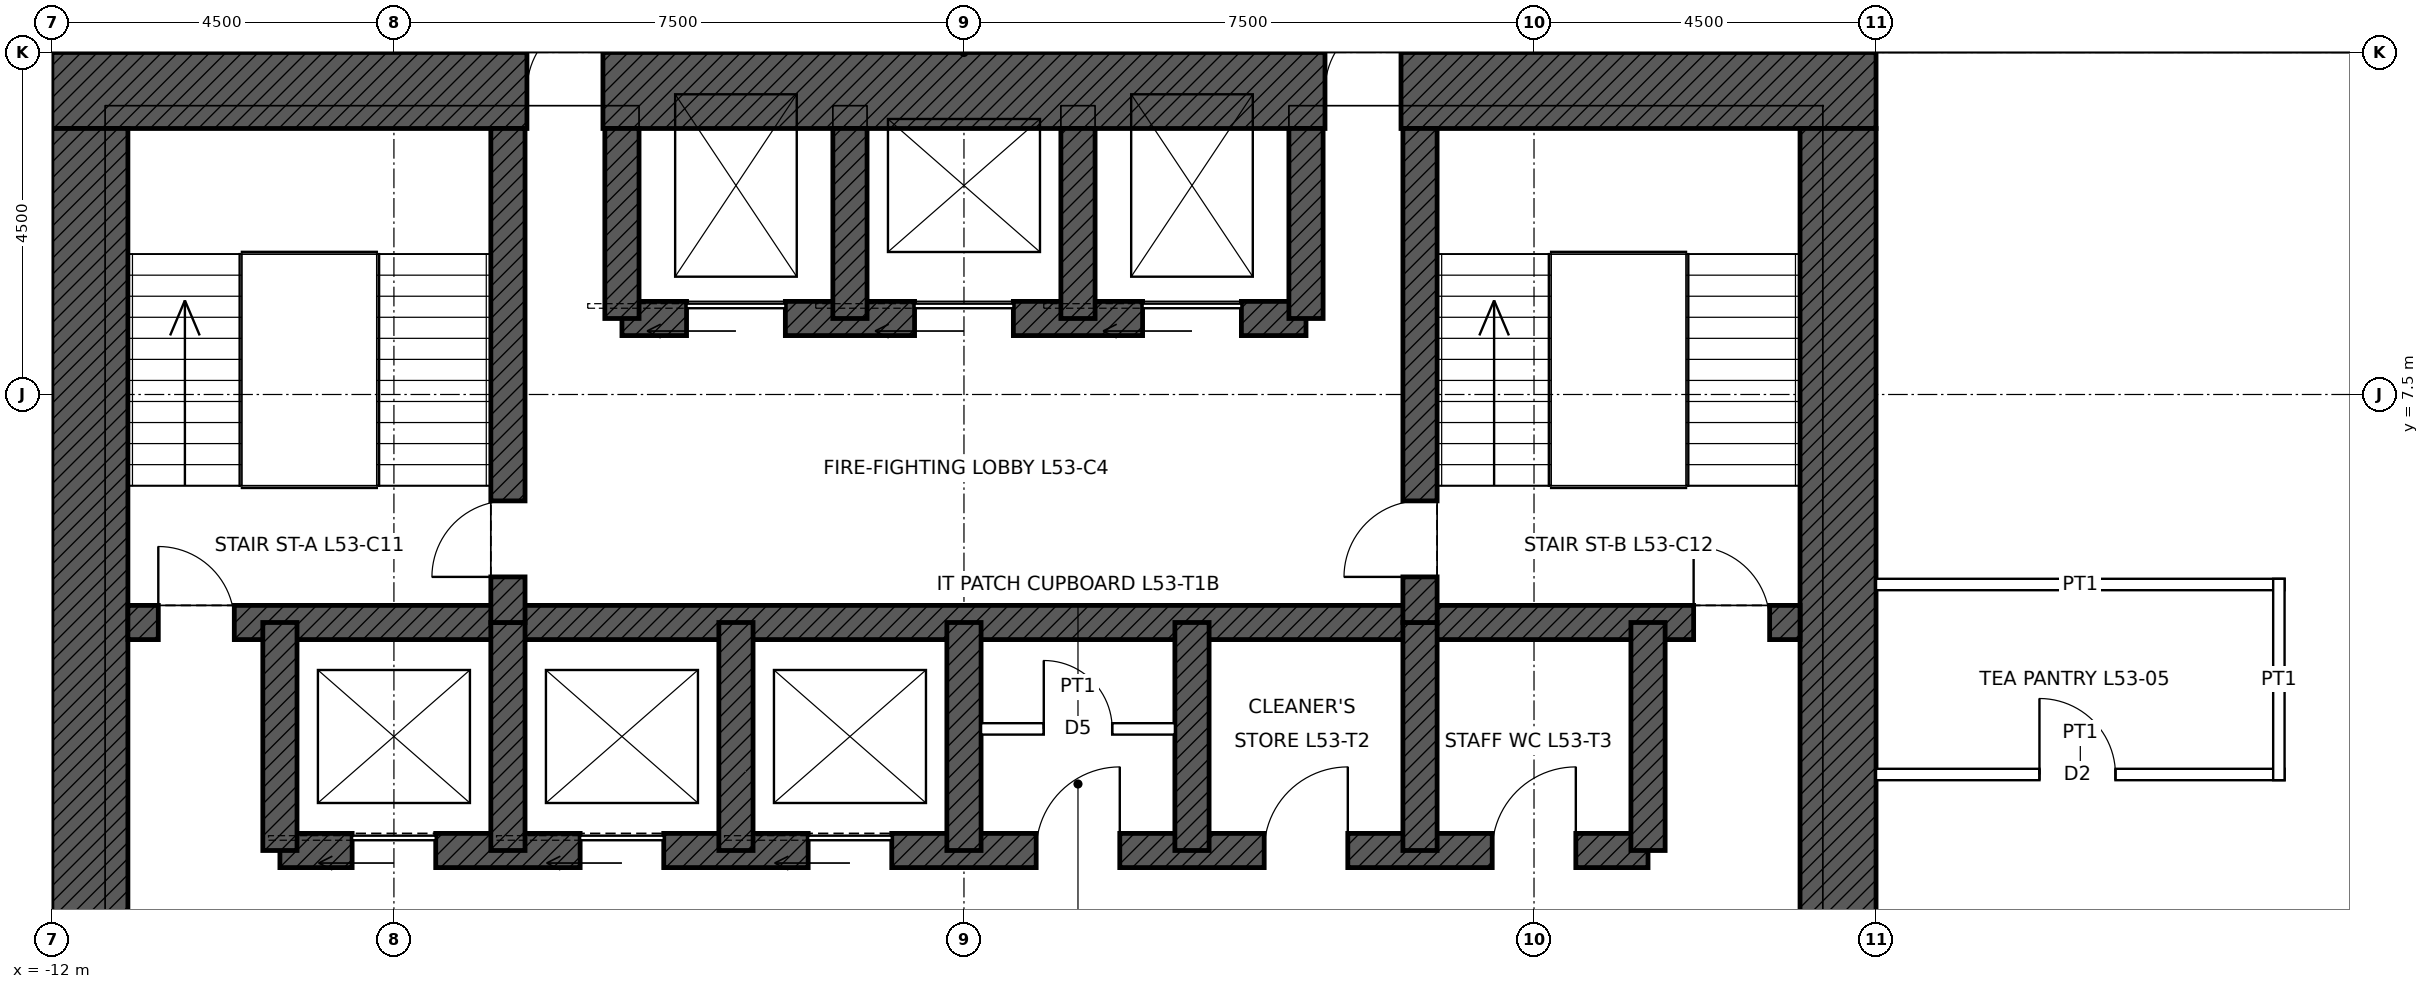
"""IFC4 building model, lengths in metres.
Left out: names, types, materials, properties, quantities, classifications, styles, units other than length and angle.
Written with IfcOpenShell. Run it as: python <this file> out.ifc"""

import sys

from ifc_helpers import new_model, si_unit, direction, frame, frame_2d, origin, place, context, subcontext, project, spatial, rectangle, extrude, element, fill, save


model = new_model("IFC4")
c1 = context("Model", 3, precision=1e-05, world=origin(), true_north=direction((0.0, 1.0)))
c2 = subcontext(c1, "Body", "Model", "MODEL_VIEW")
j1 = project(units=[si_unit("LENGTHUNIT", "METRE"), si_unit("PLANEANGLEUNIT", "RADIAN")], contexts=[c1])
p1 = place(None, origin())
s1 = spatial("IfcSite", under=j1, at=p1, CompositionType="ELEMENT")
p2 = place(p1, origin())
s2 = spatial("IfcBuilding", under=s1, at=p2, CompositionType="ELEMENT")
p3 = place(p2, frame((0.0, 0.0, 245.9)))
s3 = spatial("IfcBuildingStorey", under=s2, at=p3, CompositionType="ELEMENT", Elevation=245.9)
p4 = place(p3, frame((-12.0, 11.5, 0.0), z_axis=(0.0, 0.0, 1.0), x_axis=(1.0, 0.0, 0.0)))
e1 = element("IfcWall", 1, at=p4, inside=s3, PredefinedType="SHEAR", context=c2, shape_type="SweptSolid", body=[
    extrude(rectangle(XDim=24.0, YDim=1.0, at=frame_2d((12.0, 0.0))), origin(), (0.0, 0.0, 1.0), 4.0),
])
p5 = place(p4, frame((6.25, 0.0, 0.0)))
e2 = element("IfcOpeningElement", 2, at=p5, cuts=e1, PredefinedType="OPENING", context=c2, shape_type="SweptSolid", body=[
    extrude(rectangle(XDim=1.0, YDim=2.4, at=frame_2d((0.5, 1.2))), frame((0.0, 0.51, 0.0), z_axis=(0.0, -1.0, 0.0), x_axis=(1.0, 0.0, 0.0)), (0.0, 0.0, 1.0), 1.02),
])
p6 = place(p4, frame((16.75, 0.0, 0.0)))
e3 = element("IfcOpeningElement", 3, at=p6, cuts=e1, PredefinedType="OPENING", context=c2, shape_type="SweptSolid", body=[
    extrude(rectangle(XDim=1.0, YDim=2.4, at=frame_2d((0.5, 1.2))), frame((0.0, 0.51, 0.0), z_axis=(0.0, -1.0, 0.0), x_axis=(1.0, 0.0, 0.0)), (0.0, 0.0, 1.0), 1.02),
])
p7 = place(p3, frame((11.5, 11.0, 0.0), z_axis=(0.0, 0.0, 1.0), x_axis=(0.0, -1.0, 0.0)))
e4 = element("IfcWall", 4, at=p7, inside=s3, PredefinedType="SHEAR", context=c2, shape_type="SweptSolid", body=[
    extrude(rectangle(XDim=22.0, YDim=1.0, at=frame_2d((11.0, 0.0))), origin(), (0.0, 0.0, 1.0), 4.0),
])
p8 = place(p7, frame((10.5, 0.0, 0.0)))
e5 = element("IfcOpeningElement", 5, at=p8, cuts=e4, PredefinedType="OPENING", context=c2, shape_type="SweptSolid", body=[
    extrude(rectangle(XDim=1.0, YDim=2.4, at=frame_2d((0.5, 1.2))), frame((0.0, 0.51, 0.0), z_axis=(0.0, -1.0, 0.0), x_axis=(1.0, 0.0, 0.0)), (0.0, 0.0, 1.0), 1.02),
])
p9 = place(p3, frame((-11.5, -11.0, 0.0), z_axis=(0.0, 0.0, 1.0), x_axis=(0.0, 1.0, 0.0)))
e6 = element("IfcWall", 6, at=p9, inside=s3, PredefinedType="SHEAR", context=c2, shape_type="SweptSolid", body=[
    extrude(rectangle(XDim=22.0, YDim=1.0, at=frame_2d((11.0, 0.0))), origin(), (0.0, 0.0, 1.0), 4.0),
])
p10 = place(p9, frame((10.5, 0.0, 0.0)))
e7 = element("IfcOpeningElement", 7, at=p10, cuts=e6, PredefinedType="OPENING", context=c2, shape_type="SweptSolid", body=[
    extrude(rectangle(XDim=1.0, YDim=2.4, at=frame_2d((0.5, 1.2))), frame((0.0, 0.51, 0.0), z_axis=(0.0, -1.0, 0.0), x_axis=(1.0, 0.0, 0.0)), (0.0, 0.0, 1.0), 1.02),
])
p11 = place(p3, frame((-11.0, 4.5, 0.0), z_axis=(0.0, 0.0, 1.0), x_axis=(1.0, 0.0, 0.0)))
e8 = element("IfcWall", 8, at=p11, inside=s3, PredefinedType="SHEAR", context=c2, shape_type="SweptSolid", body=[
    extrude(rectangle(XDim=22.0, YDim=0.45, at=frame_2d((11.0, 0.0))), origin(), (0.0, 0.0, 1.0), 4.0),
])
p12 = place(p11, frame((0.4, 0.0, 0.0)))
e9 = element("IfcOpeningElement", 9, at=p12, cuts=e8, PredefinedType="OPENING", context=c2, shape_type="SweptSolid", body=[
    extrude(rectangle(XDim=1.0, YDim=2.1, at=frame_2d((0.5, 1.05))), frame((0.0, 0.235, 0.0), z_axis=(0.0, -1.0, 0.0), x_axis=(1.0, 0.0, 0.0)), (0.0, 0.0, 1.0), 0.47),
])
p13 = place(p11, frame((20.6, 0.0, 0.0)))
e10 = element("IfcOpeningElement", 10, at=p13, cuts=e8, PredefinedType="OPENING", context=c2, shape_type="SweptSolid", body=[
    extrude(rectangle(XDim=1.0, YDim=2.1, at=frame_2d((0.5, 1.05))), frame((0.0, 0.235, 0.0), z_axis=(0.0, -1.0, 0.0), x_axis=(1.0, 0.0, 0.0)), (0.0, 0.0, 1.0), 0.47),
])
p14 = place(p3, frame((-9.0, 1.5, 0.0), z_axis=(0.0, 0.0, 1.0), x_axis=(1.0, 0.0, 0.0)))
e11 = element("IfcWall", 11, at=p14, inside=s3, PredefinedType="SHEAR", context=c2, shape_type="SweptSolid", body=[
    extrude(rectangle(XDim=18.0, YDim=0.45, at=frame_2d((9.0, 0.0))), origin(), (0.0, 0.0, 1.0), 4.0),
])
p15 = place(p14, frame((0.95, 0.0, 0.0)))
e12 = element("IfcOpeningElement", 12, at=p15, cuts=e11, PredefinedType="OPENING", context=c2, shape_type="SweptSolid", body=[
    extrude(rectangle(XDim=1.1, YDim=2.1, at=frame_2d((0.55, 1.05))), frame((0.0, 0.235, 0.0), z_axis=(0.0, -1.0, 0.0), x_axis=(1.0, 0.0, 0.0)), (0.0, 0.0, 1.0), 0.47),
])
p16 = place(p14, frame((3.95, 0.0, 0.0)))
e13 = element("IfcOpeningElement", 13, at=p16, cuts=e11, PredefinedType="OPENING", context=c2, shape_type="SweptSolid", body=[
    extrude(rectangle(XDim=1.1, YDim=2.1, at=frame_2d((0.55, 1.05))), frame((0.0, 0.235, 0.0), z_axis=(0.0, -1.0, 0.0), x_axis=(1.0, 0.0, 0.0)), (0.0, 0.0, 1.0), 0.47),
])
p17 = place(p14, frame((6.95, 0.0, 0.0)))
e14 = element("IfcOpeningElement", 14, at=p17, cuts=e11, PredefinedType="OPENING", context=c2, shape_type="SweptSolid", body=[
    extrude(rectangle(XDim=1.1, YDim=2.1, at=frame_2d((0.55, 1.05))), frame((0.0, 0.235, 0.0), z_axis=(0.0, -1.0, 0.0), x_axis=(1.0, 0.0, 0.0)), (0.0, 0.0, 1.0), 0.47),
])
p18 = place(p14, frame((9.95, 0.0, 0.0)))
e15 = element("IfcOpeningElement", 15, at=p18, cuts=e11, PredefinedType="OPENING", context=c2, shape_type="SweptSolid", body=[
    extrude(rectangle(XDim=1.1, YDim=2.1, at=frame_2d((0.55, 1.05))), frame((0.0, 0.235, 0.0), z_axis=(0.0, -1.0, 0.0), x_axis=(1.0, 0.0, 0.0)), (0.0, 0.0, 1.0), 0.47),
])
p19 = place(p14, frame((12.95, 0.0, 0.0)))
e16 = element("IfcOpeningElement", 16, at=p19, cuts=e11, PredefinedType="OPENING", context=c2, shape_type="SweptSolid", body=[
    extrude(rectangle(XDim=1.1, YDim=2.1, at=frame_2d((0.55, 1.05))), frame((0.0, 0.235, 0.0), z_axis=(0.0, -1.0, 0.0), x_axis=(1.0, 0.0, 0.0)), (0.0, 0.0, 1.0), 0.47),
])
p20 = place(p14, frame((15.95, 0.0, 0.0)))
e17 = element("IfcOpeningElement", 17, at=p20, cuts=e11, PredefinedType="OPENING", context=c2, shape_type="SweptSolid", body=[
    extrude(rectangle(XDim=1.1, YDim=2.1, at=frame_2d((0.55, 1.05))), frame((0.0, 0.235, 0.0), z_axis=(0.0, -1.0, 0.0), x_axis=(1.0, 0.0, 0.0)), (0.0, 0.0, 1.0), 0.47),
])
p21 = place(p3, frame((-4.5, 8.5, 0.0), z_axis=(0.0, 0.0, 1.0), x_axis=(1.0, 0.0, 0.0)))
e18 = element("IfcWall", 18, at=p21, inside=s3, PredefinedType="SHEAR", context=c2, shape_type="SweptSolid", body=[
    extrude(rectangle(XDim=9.0, YDim=0.45, at=frame_2d((4.5, 0.0))), origin(), (0.0, 0.0, 1.0), 4.0),
])
p22 = place(p21, frame((0.85, 0.0, 0.0)))
e19 = element("IfcOpeningElement", 19, at=p22, cuts=e18, PredefinedType="OPENING", context=c2, shape_type="SweptSolid", body=[
    extrude(rectangle(XDim=1.3, YDim=2.4, at=frame_2d((0.65, 1.2))), frame((0.0, 0.235, 0.0), z_axis=(0.0, -1.0, 0.0), x_axis=(1.0, 0.0, 0.0)), (0.0, 0.0, 1.0), 0.47),
])
p23 = place(p21, frame((6.85, 0.0, 0.0)))
e20 = element("IfcOpeningElement", 20, at=p23, cuts=e18, PredefinedType="OPENING", context=c2, shape_type="SweptSolid", body=[
    extrude(rectangle(XDim=1.3, YDim=2.4, at=frame_2d((0.65, 1.2))), frame((0.0, 0.235, 0.0), z_axis=(0.0, -1.0, 0.0), x_axis=(1.0, 0.0, 0.0)), (0.0, 0.0, 1.0), 0.47),
])
p24 = place(p21, frame((3.85, 0.0, 0.0)))
e21 = element("IfcOpeningElement", 21, at=p24, cuts=e18, PredefinedType="OPENING", context=c2, shape_type="SweptSolid", body=[
    extrude(rectangle(XDim=1.3, YDim=2.4, at=frame_2d((0.65, 1.2))), frame((0.0, 0.235, 0.0), z_axis=(0.0, -1.0, 0.0), x_axis=(1.0, 0.0, 0.0)), (0.0, 0.0, 1.0), 0.47),
])
for number, where, z_axis, x_axis in (
    (22, (-9.0, 1.5, 0.0), (0.0, 0.0, 1.0), (0.0, 1.0, 0.0)),
    (23, (9.0, 1.5, 0.0), (0.0, 0.0, 1.0), (0.0, 1.0, 0.0)),
    (24, (-6.0, 1.5, 0.0), (0.0, 0.0, 1.0), (0.0, 1.0, 0.0)),
    (25, (-3.0, 1.5, 0.0), (0.0, 0.0, 1.0), (0.0, 1.0, 0.0)),
    (26, (0.0, 1.5, 0.0), (0.0, 0.0, 1.0), (0.0, 1.0, 0.0)),
    (27, (3.0, 1.5, 0.0), (0.0, 0.0, 1.0), (0.0, 1.0, 0.0)),
    (28, (6.0, 1.5, 0.0), (0.0, 0.0, 1.0), (0.0, 1.0, 0.0)),
):
    element("IfcWall", number, at=place(p3, frame(where, z_axis=z_axis, x_axis=x_axis)), inside=s3, PredefinedType="SHEAR", context=c2, shape_type="SweptSolid", body=[
        extrude(rectangle(XDim=3.0, YDim=0.45, at=frame_2d((1.5, 0.0))), origin(), (0.0, 0.0, 1.0), 4.0),
    ])
p25 = place(p3, frame((-6.0, 4.5, 0.0), z_axis=(0.0, 0.0, 1.0), x_axis=(0.0, 1.0, 0.0)))
e29 = element("IfcWall", 29, at=p25, inside=s3, PredefinedType="SHEAR", context=c2, shape_type="SweptSolid", body=[
    extrude(rectangle(XDim=6.5, YDim=0.45, at=frame_2d((3.25, 0.0))), origin(), (0.0, 0.0, 1.0), 4.0),
])
p26 = place(p25, frame((0.6, 0.0, 0.0)))
e30 = element("IfcOpeningElement", 30, at=p26, cuts=e29, PredefinedType="OPENING", context=c2, shape_type="SweptSolid", body=[
    extrude(rectangle(XDim=1.0, YDim=2.1, at=frame_2d((0.5, 1.05))), frame((0.0, 0.235, 0.0), z_axis=(0.0, -1.0, 0.0), x_axis=(1.0, 0.0, 0.0)), (0.0, 0.0, 1.0), 0.47),
])
p27 = place(p3, frame((6.0, 4.5, 0.0), z_axis=(0.0, 0.0, 1.0), x_axis=(0.0, 1.0, 0.0)))
e31 = element("IfcWall", 31, at=p27, inside=s3, PredefinedType="SHEAR", context=c2, shape_type="SweptSolid", body=[
    extrude(rectangle(XDim=6.5, YDim=0.45, at=frame_2d((3.25, 0.0))), origin(), (0.0, 0.0, 1.0), 4.0),
])
p28 = place(p27, frame((0.6, 0.0, 0.0)))
e32 = element("IfcOpeningElement", 32, at=p28, cuts=e31, PredefinedType="OPENING", context=c2, shape_type="SweptSolid", body=[
    extrude(rectangle(XDim=1.0, YDim=2.1, at=frame_2d((0.5, 1.05))), frame((0.0, 0.235, 0.0), z_axis=(0.0, -1.0, 0.0), x_axis=(1.0, 0.0, 0.0)), (0.0, 0.0, 1.0), 0.47),
])
for number, where, z_axis, x_axis in (
    (33, (-4.5, 8.5, 0.0), (0.0, 0.0, 1.0), (0.0, 1.0, 0.0)),
    (34, (4.5, 8.5, 0.0), (0.0, 0.0, 1.0), (0.0, 1.0, 0.0)),
    (35, (-1.5, 8.5, 0.0), (0.0, 0.0, 1.0), (0.0, 1.0, 0.0)),
    (36, (1.5, 8.5, 0.0), (0.0, 0.0, 1.0), (0.0, 1.0, 0.0)),
):
    element("IfcWall", number, at=place(p3, frame(where, z_axis=z_axis, x_axis=x_axis)), inside=s3, PredefinedType="SHEAR", context=c2, shape_type="SweptSolid", body=[
        extrude(rectangle(XDim=2.5, YDim=0.45, at=frame_2d((1.25, 0.0))), origin(), (0.0, 0.0, 1.0), 4.0),
    ])
p29 = place(p3, frame((12.0, 2.5, 0.0), z_axis=(0.0, 0.0, 1.0), x_axis=(1.0, 0.0, 0.0)))
e37 = element("IfcWall", 37, at=p29, inside=s3, PredefinedType="PARTITIONING", context=c2, shape_type="SweptSolid", body=[
    extrude(rectangle(XDim=5.375, YDim=0.15, at=frame_2d((2.688, 0.0))), origin(), (0.0, 0.0, 1.0), 3.85),
])
p30 = place(p29, frame((2.15, 0.0, 0.0)))
e38 = element("IfcOpeningElement", 38, at=p30, cuts=e37, PredefinedType="OPENING", context=c2, shape_type="SweptSolid", body=[
    extrude(rectangle(XDim=1.0, YDim=2.1, at=frame_2d((0.5, 1.05))), frame((0.0, 0.085, 0.0), z_axis=(0.0, -1.0, 0.0), x_axis=(1.0, 0.0, 0.0)), (0.0, 0.0, 1.0), 0.17),
])
p31 = place(p3, frame((12.0, 5.0, 0.0), z_axis=(0.0, 0.0, 1.0), x_axis=(1.0, 0.0, 0.0)))
e39 = element("IfcWall", 39, at=p31, inside=s3, PredefinedType="PARTITIONING", context=c2, shape_type="SweptSolid", body=[
    extrude(rectangle(XDim=5.375, YDim=0.15, at=frame_2d((2.688, 0.0))), origin(), (0.0, 0.0, 1.0), 3.85),
])
p32 = place(p3, frame((17.3, 2.425, 0.0), z_axis=(0.0, 0.0, 1.0), x_axis=(0.0, 1.0, 0.0)))
e40 = element("IfcWall", 40, at=p32, inside=s3, PredefinedType="PARTITIONING", context=c2, shape_type="SweptSolid", body=[
    extrude(rectangle(XDim=2.65, YDim=0.15, at=frame_2d((1.325, 0.0))), origin(), (0.0, 0.0, 1.0), 3.85),
])
p33 = place(p3, frame((0.225, 3.1, 0.0), z_axis=(0.0, 0.0, 1.0), x_axis=(1.0, 0.0, 0.0)))
e41 = element("IfcWall", 41, at=p33, inside=s3, PredefinedType="PARTITIONING", context=c2, shape_type="SweptSolid", body=[
    extrude(rectangle(XDim=2.55, YDim=0.15, at=frame_2d((1.275, 0.0))), origin(), (0.0, 0.0, 1.0), 3.75),
])
p34 = place(p33, frame((0.825, 0.0, 0.0)))
e42 = element("IfcOpeningElement", 42, at=p34, cuts=e41, PredefinedType="OPENING", context=c2, shape_type="SweptSolid", body=[
    extrude(rectangle(XDim=0.9, YDim=2.1, at=frame_2d((0.45, 1.05))), frame((0.0, 0.085, 0.0), z_axis=(0.0, -1.0, 0.0), x_axis=(1.0, 0.0, 0.0)), (0.0, 0.0, 1.0), 0.17),
])
p35 = place(p12, origin())
e43 = element("IfcDoor", 43, at=p35, inside=s3, OperationType="SINGLE_SWING_LEFT", PredefinedType="DOOR", context=c2, shape_type="SweptSolid", body=[
    extrude(rectangle(XDim=1.0, YDim=2.1, at=frame_2d((0.5, 1.05))), frame((0.0, 0.025, 0.0), z_axis=(0.0, -1.0, 0.0), x_axis=(1.0, 0.0, 0.0)), (0.0, 0.0, 1.0), 0.05),
])
fill(e9, e43)
p36 = place(p13, origin())
e44 = element("IfcDoor", 44, at=p36, inside=s3, OperationType="SINGLE_SWING_LEFT", PredefinedType="DOOR", context=c2, shape_type="SweptSolid", body=[
    extrude(rectangle(XDim=1.0, YDim=2.1, at=frame_2d((0.5, 1.05))), frame((0.0, 0.025, 0.0), z_axis=(0.0, -1.0, 0.0), x_axis=(1.0, 0.0, 0.0)), (0.0, 0.0, 1.0), 0.05),
])
fill(e10, e44)
p37 = place(p26, origin())
e45 = element("IfcDoor", 45, at=p37, inside=s3, OperationType="SINGLE_SWING_LEFT", PredefinedType="DOOR", context=c2, shape_type="SweptSolid", body=[
    extrude(rectangle(XDim=1.0, YDim=2.1, at=frame_2d((0.5, 1.05))), frame((0.0, 0.025, 0.0), z_axis=(0.0, -1.0, 0.0), x_axis=(1.0, 0.0, 0.0)), (0.0, 0.0, 1.0), 0.05),
])
fill(e30, e45)
p38 = place(p28, origin())
e46 = element("IfcDoor", 46, at=p38, inside=s3, OperationType="SINGLE_SWING_LEFT", PredefinedType="DOOR", context=c2, shape_type="SweptSolid", body=[
    extrude(rectangle(XDim=1.0, YDim=2.1, at=frame_2d((0.5, 1.05))), frame((0.0, 0.025, 0.0), z_axis=(0.0, -1.0, 0.0), x_axis=(1.0, 0.0, 0.0)), (0.0, 0.0, 1.0), 0.05),
])
fill(e32, e46)
p39 = place(p5, origin())
e47 = element("IfcDoor", 47, at=p39, inside=s3, OperationType="SINGLE_SWING_RIGHT", PredefinedType="DOOR", context=c2, shape_type="SweptSolid", body=[
    extrude(rectangle(XDim=1.0, YDim=2.4, at=frame_2d((0.5, 1.2))), frame((0.0, 0.485, 0.0), z_axis=(0.0, -1.0, 0.0), x_axis=(1.0, 0.0, 0.0)), (0.0, 0.0, 1.0), 0.05),
])
fill(e2, e47)
p40 = place(p6, origin())
e48 = element("IfcDoor", 48, at=p40, inside=s3, OperationType="SINGLE_SWING_RIGHT", PredefinedType="DOOR", context=c2, shape_type="SweptSolid", body=[
    extrude(rectangle(XDim=1.0, YDim=2.4, at=frame_2d((0.5, 1.2))), frame((0.0, 0.485, 0.0), z_axis=(0.0, -1.0, 0.0), x_axis=(1.0, 0.0, 0.0)), (0.0, 0.0, 1.0), 0.05),
])
fill(e3, e48)
p41 = place(p22, origin())
e49 = element("IfcDoor", 49, at=p41, inside=s3, OperationType="SLIDING_TO_LEFT", PredefinedType="DOOR", context=c2, shape_type="SweptSolid", body=[
    extrude(rectangle(XDim=1.3, YDim=2.4, at=frame_2d((0.65, 1.2))), frame((0.0, 0.025, 0.0), z_axis=(0.0, -1.0, 0.0), x_axis=(1.0, 0.0, 0.0)), (0.0, 0.0, 1.0), 0.05),
])
fill(e19, e49)
p42 = place(p23, origin())
e50 = element("IfcDoor", 50, at=p42, inside=s3, OperationType="SLIDING_TO_LEFT", PredefinedType="DOOR", context=c2, shape_type="SweptSolid", body=[
    extrude(rectangle(XDim=1.3, YDim=2.4, at=frame_2d((0.65, 1.2))), frame((0.0, 0.025, 0.0), z_axis=(0.0, -1.0, 0.0), x_axis=(1.0, 0.0, 0.0)), (0.0, 0.0, 1.0), 0.05),
])
fill(e20, e50)
p43 = place(p24, origin())
e51 = element("IfcDoor", 51, at=p43, inside=s3, OperationType="SLIDING_TO_LEFT", PredefinedType="DOOR", context=c2, shape_type="SweptSolid", body=[
    extrude(rectangle(XDim=1.3, YDim=2.4, at=frame_2d((0.65, 1.2))), frame((0.0, 0.025, 0.0), z_axis=(0.0, -1.0, 0.0), x_axis=(1.0, 0.0, 0.0)), (0.0, 0.0, 1.0), 0.05),
])
fill(e21, e51)
p44 = place(p15, origin())
e52 = element("IfcDoor", 52, at=p44, inside=s3, OperationType="SLIDING_TO_LEFT", PredefinedType="DOOR", context=c2, shape_type="SweptSolid", body=[
    extrude(rectangle(XDim=1.1, YDim=2.1, at=frame_2d((0.55, 1.05))), frame((0.0, 0.025, 0.0), z_axis=(0.0, -1.0, 0.0), x_axis=(1.0, 0.0, 0.0)), (0.0, 0.0, 1.0), 0.05),
])
fill(e12, e52)
p45 = place(p16, origin())
e53 = element("IfcDoor", 53, at=p45, inside=s3, OperationType="SLIDING_TO_LEFT", PredefinedType="DOOR", context=c2, shape_type="SweptSolid", body=[
    extrude(rectangle(XDim=1.1, YDim=2.1, at=frame_2d((0.55, 1.05))), frame((0.0, 0.025, 0.0), z_axis=(0.0, -1.0, 0.0), x_axis=(1.0, 0.0, 0.0)), (0.0, 0.0, 1.0), 0.05),
])
fill(e13, e53)
p46 = place(p17, origin())
e54 = element("IfcDoor", 54, at=p46, inside=s3, OperationType="SLIDING_TO_LEFT", PredefinedType="DOOR", context=c2, shape_type="SweptSolid", body=[
    extrude(rectangle(XDim=1.1, YDim=2.1, at=frame_2d((0.55, 1.05))), frame((0.0, 0.025, 0.0), z_axis=(0.0, -1.0, 0.0), x_axis=(1.0, 0.0, 0.0)), (0.0, 0.0, 1.0), 0.05),
])
fill(e14, e54)
p47 = place(p18, origin())
e55 = element("IfcDoor", 55, at=p47, inside=s3, OperationType="SINGLE_SWING_RIGHT", PredefinedType="DOOR", context=c2, shape_type="SweptSolid", body=[
    extrude(rectangle(XDim=1.1, YDim=2.1, at=frame_2d((0.55, 1.05))), frame((0.0, 0.025, 0.0), z_axis=(0.0, -1.0, 0.0), x_axis=(1.0, 0.0, 0.0)), (0.0, 0.0, 1.0), 0.05),
])
fill(e15, e55)
p48 = place(p34, origin())
e56 = element("IfcDoor", 56, at=p48, inside=s3, OperationType="SINGLE_SWING_LEFT", PredefinedType="DOOR", context=c2, shape_type="SweptSolid", body=[
    extrude(rectangle(XDim=0.9, YDim=2.1, at=frame_2d((0.45, 1.05))), frame((0.0, 0.025, 0.0), z_axis=(0.0, -1.0, 0.0), x_axis=(1.0, 0.0, 0.0)), (0.0, 0.0, 1.0), 0.05),
])
fill(e42, e56)
p49 = place(p19, origin())
e57 = element("IfcDoor", 57, at=p49, inside=s3, OperationType="SINGLE_SWING_RIGHT", PredefinedType="DOOR", context=c2, shape_type="SweptSolid", body=[
    extrude(rectangle(XDim=1.1, YDim=2.1, at=frame_2d((0.55, 1.05))), frame((0.0, 0.025, 0.0), z_axis=(0.0, -1.0, 0.0), x_axis=(1.0, 0.0, 0.0)), (0.0, 0.0, 1.0), 0.05),
])
fill(e16, e57)
p50 = place(p20, origin())
e58 = element("IfcDoor", 58, at=p50, inside=s3, OperationType="SINGLE_SWING_RIGHT", PredefinedType="DOOR", context=c2, shape_type="SweptSolid", body=[
    extrude(rectangle(XDim=1.1, YDim=2.1, at=frame_2d((0.55, 1.05))), frame((0.0, 0.025, 0.0), z_axis=(0.0, -1.0, 0.0), x_axis=(1.0, 0.0, 0.0)), (0.0, 0.0, 1.0), 0.05),
])
fill(e17, e58)
p51 = place(p30, origin())
e59 = element("IfcDoor", 59, at=p51, inside=s3, OperationType="SINGLE_SWING_LEFT", PredefinedType="DOOR", context=c2, shape_type="SweptSolid", body=[
    extrude(rectangle(XDim=1.0, YDim=2.1, at=frame_2d((0.5, 1.05))), frame((0.0, 0.025, 0.0), z_axis=(0.0, -1.0, 0.0), x_axis=(1.0, 0.0, 0.0)), (0.0, 0.0, 1.0), 0.05),
])
fill(e38, e59)
save(model, sys.argv[1])
